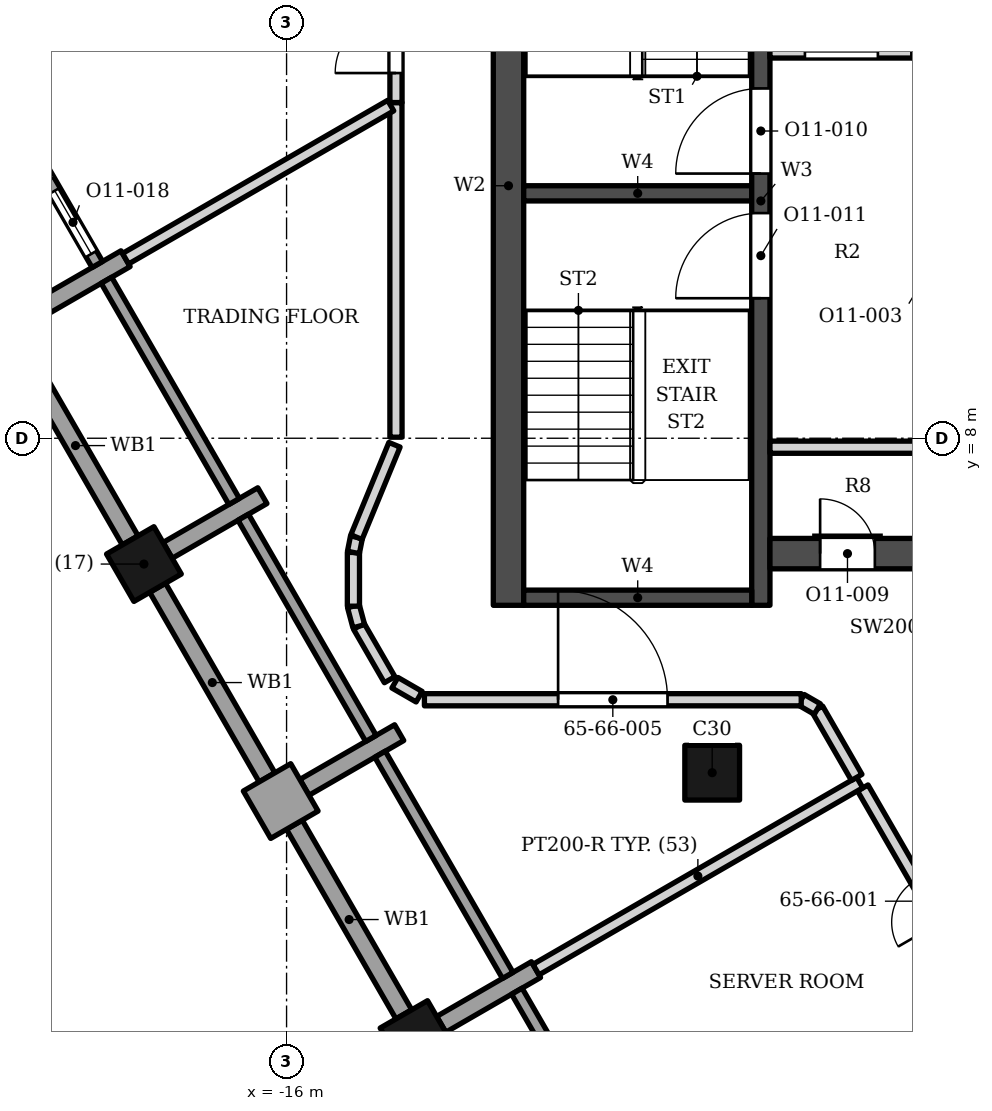
"""IFC4 building model, lengths in metres.
Left out: names, types, materials, properties, quantities, classifications, styles, units other than length and angle.
Written with IfcOpenShell. Run it as: python <this file> out.ifc"""

import sys

from ifc_helpers import new_model, si_unit, direction, frame, frame_2d, origin, origin_2d, place, context, subcontext, project, spatial, rectangle, extrude, element, fill, save


model = new_model("IFC4")
c1 = context("Model", 3, precision=1e-05, world=origin(), true_north=direction((0.0, 1.0)))
c2 = subcontext(c1, "Body", "Model", "MODEL_VIEW")
j1 = project(units=[si_unit("LENGTHUNIT", "METRE"), si_unit("PLANEANGLEUNIT", "RADIAN")], contexts=[c1])
p1 = place(None, origin())
s1 = spatial("IfcSite", under=j1, at=p1, CompositionType="ELEMENT")
p2 = place(p1, origin())
s2 = spatial("IfcBuilding", under=s1, at=p2, CompositionType="ELEMENT")
p3 = place(p2, frame((0.0, 0.0, 271.6)))
s3 = spatial("IfcBuildingStorey", under=s2, at=p3, CompositionType="ELEMENT", Elevation=271.6)
p4 = place(p3, frame((-12.35, 5.253, 0.0), z_axis=(0.0, 0.0, 1.0), x_axis=(0.0, 1.0, 0.0)))
e1 = element("IfcWall", 1, at=p4, inside=s3, PredefinedType="SHEAR", context=c2, shape_type="SweptSolid", body=[
    extrude(rectangle(XDim=13.8, YDim=0.5, at=frame_2d((6.9, 0.0))), origin(), (0.0, 0.0, 1.0), 3.9),
])
p5 = place(p3, frame((-8.2, 5.253, 0.0), z_axis=(0.0, 0.0, 1.0), x_axis=(0.0, 1.0, 0.0)))
e2 = element("IfcWall", 2, at=p5, inside=s3, PredefinedType="SHEAR", context=c2, shape_type="SweptSolid", body=[
    extrude(rectangle(XDim=13.3, YDim=0.3, at=frame_2d((6.65, 0.0))), origin(), (0.0, 0.0, 1.0), 3.9),
])
p6 = place(p5, frame((7.1, 0.0, 0.0)))
e3 = element("IfcOpeningElement", 3, at=p6, cuts=e2, PredefinedType="OPENING", context=c2, shape_type="SweptSolid", body=[
    extrude(rectangle(XDim=1.4, YDim=2.1, at=frame_2d((0.7, 1.05))), frame((0.0, 0.16, 0.0), z_axis=(0.0, -1.0, 0.0), x_axis=(1.0, 0.0, 0.0)), (0.0, 0.0, 1.0), 0.32),
])
p7 = place(p5, frame((5.05, 0.0, 0.0)))
e4 = element("IfcOpeningElement", 4, at=p7, cuts=e2, PredefinedType="OPENING", context=c2, shape_type="SweptSolid", body=[
    extrude(rectangle(XDim=1.4, YDim=2.1, at=frame_2d((0.7, 1.05))), frame((0.0, 0.16, 0.0), z_axis=(0.0, -1.0, 0.0), x_axis=(1.0, 0.0, 0.0)), (0.0, 0.0, 1.0), 0.32),
])
for number, where, z_axis, x_axis in (
    (5, (-12.1, 12.028, 0.0), (0.0, 0.0, 1.0), (1.0, 0.0, 0.0)),
    (6, (-12.1, 5.378, 0.0), (0.0, 0.0, 1.0), (1.0, 0.0, 0.0)),
):
    element("IfcWall", number, at=place(p3, frame(where, z_axis=z_axis, x_axis=x_axis)), inside=s3, PredefinedType="SHEAR", context=c2, shape_type="SweptSolid", body=[
        extrude(rectangle(XDim=3.75, YDim=0.25, at=frame_2d((1.875, 0.0))), origin(), (0.0, 0.0, 1.0), 3.9),
    ])
p8 = place(p3, frame((-8.05, 6.103, 0.0), z_axis=(0.0, 0.0, 1.0), x_axis=(1.0, 0.0, 0.0)))
e7 = element("IfcWall", 7, at=p8, inside=s3, PredefinedType="SHEAR", context=c2, shape_type="SweptSolid", body=[
    extrude(rectangle(XDim=7.05, YDim=0.5, at=frame_2d((3.525, 0.0))), origin(), (0.0, 0.0, 1.0), 3.9),
])
p9 = place(p8, frame((0.825, 0.0, 0.0)))
e8 = element("IfcOpeningElement", 8, at=p9, cuts=e7, PredefinedType="OPENING", context=c2, shape_type="SweptSolid", body=[
    extrude(rectangle(XDim=0.9, YDim=2.1, at=frame_2d((0.45, 1.05))), frame((0.0, 0.26, 0.0), z_axis=(0.0, -1.0, 0.0), x_axis=(1.0, 0.0, 0.0)), (0.0, 0.0, 1.0), 0.52),
])
for number, where, z_axis, x_axis in (
    (9, (-9.0, 2.5, 0.0), (0.0, 0.0, 1.0), (1.0, 0.0, 0.0)),
    (10, (-18.346, 5.931, 0.0), (0.0, 0.0, 1.0), (0.5, -0.866, 0.0)),
    (11, (-13.846, -1.864, 0.0), (0.0, 0.0, 1.0), (0.5, -0.866, 0.0)),
):
    element("IfcColumn", number, at=place(p3, frame(where, z_axis=z_axis, x_axis=x_axis)), inside=s3, PredefinedType="COLUMN", context=c2, shape_type="SweptSolid", body=[
        extrude(rectangle(XDim=0.9, YDim=0.9, at=origin_2d()), origin(), (0.0, 0.0, 1.0), 3.9),
    ])
p10 = place(p3, frame((-20.207, 10.053, 0.0), z_axis=(0.0, 0.0, 1.0), x_axis=(0.865989075817, 0.500062916607, 0.0)))
e12 = element("IfcWall", 12, at=p10, inside=s3, PredefinedType="SOLIDWALL", context=c2, shape_type="SweptSolid", body=[
    extrude(rectangle(XDim=1.8, YDim=0.3, at=frame_2d((0.9, 0.0))), origin(), (0.0, 0.0, 1.0), 3.0),
])
p11 = place(p3, frame((-17.956, 6.156, 0.0), z_axis=(0.0, 0.0, 1.0), x_axis=(0.866072636901, 0.499918180918, 0.0)))
e13 = element("IfcWall", 13, at=p11, inside=s3, PredefinedType="SOLIDWALL", context=c2, shape_type="SweptSolid", body=[
    extrude(rectangle(XDim=1.8, YDim=0.3, at=frame_2d((0.9, 0.0))), origin(), (0.0, 0.0, 1.0), 2.95),
])
p12 = place(p3, frame((-16.486, 1.809, 0.0), z_axis=(0.0, 0.0, 1.0), x_axis=(0.866013897511, 0.50001992892, 0.0)))
e14 = element("IfcWall", 14, at=p12, inside=s3, PredefinedType="SOLIDWALL", context=c2, shape_type="SweptSolid", body=[
    extrude(rectangle(XDim=0.9, YDim=0.9, at=frame_2d((0.45, 0.0))), origin(), (0.0, 0.0, 1.0), 3.0),
])
for number, where, z_axis, x_axis in (
    (15, (-15.707, 2.259, 0.0), (0.0, 0.0, 1.0), (0.866, 0.5, 0.0)),
    (16, (-13.457, -1.638, 0.0), (0.0, 0.0, 1.0), (0.866, 0.5, 0.0)),
):
    element("IfcWall", number, at=place(p3, frame(where, z_axis=z_axis, x_axis=x_axis)), inside=s3, PredefinedType="SOLIDWALL", context=c2, shape_type="SweptSolid", body=[
        extrude(rectangle(XDim=1.8, YDim=0.3, at=frame_2d((0.9, 0.0))), origin(), (0.0, 0.0, 1.0), 3.0),
    ])
p13 = place(p3, frame((-21.212, 14.495, 0.0), z_axis=(0.0, 0.0, 1.0), x_axis=(0.500002543286, -0.866023935413, 0.0)))
e17 = element("IfcWall", 17, at=p13, inside=s3, PredefinedType="ELEMENTEDWALL", context=c2, shape_type="SweptSolid", body=[
    extrude(rectangle(XDim=4.2, YDim=0.2, at=frame_2d((2.1, 0.0))), origin(), (0.0, 0.0, 1.0), 3.0),
])
p14 = place(p13, frame((0.2, 0.0, 0.45)))
e18 = element("IfcOpeningElement", 18, at=p14, cuts=e17, PredefinedType="OPENING", context=c2, shape_type="SweptSolid", body=[
    extrude(rectangle(XDim=2.4, YDim=2.25, at=frame_2d((1.2, 1.125))), frame((0.0, 0.11, 0.0), z_axis=(0.0, -1.0, 0.0), x_axis=(1.0, 0.0, 0.0)), (0.0, 0.0, 1.0), 0.22),
])
p15 = place(p13, frame((2.8, 0.0, 0.0)))
e19 = element("IfcOpeningElement", 19, at=p15, cuts=e17, PredefinedType="OPENING", context=c2, shape_type="SweptSolid", body=[
    extrude(rectangle(XDim=1.2, YDim=2.7, at=frame_2d((0.6, 1.35))), frame((0.0, 0.11, 0.0), z_axis=(0.0, -1.0, 0.0), x_axis=(1.0, 0.0, 0.0)), (0.0, 0.0, 1.0), 0.22),
])
p16 = place(p3, frame((-20.371, 9.438, 0.0), z_axis=(0.0, 0.0, 1.0), x_axis=(0.500012057535, -0.866018442252, 0.0)))
e20 = element("IfcWall", 20, at=p16, inside=s3, PredefinedType="SOLIDWALL", context=c2, shape_type="SweptSolid", body=[
    extrude(rectangle(XDim=3.6, YDim=0.3, at=frame_2d((1.8, 0.0))), origin(), (0.0, 0.0, 1.0), 3.0),
])
p17 = place(p3, frame((-18.962, 10.598, 0.0), z_axis=(0.0, 0.0, 1.0), x_axis=(0.500027713859, -0.866009402589, 0.0)))
e21 = element("IfcWall", 21, at=p17, inside=s3, PredefinedType="ELEMENTEDWALL", context=c2, shape_type="SweptSolid", body=[
    extrude(rectangle(XDim=4.2, YDim=0.2, at=frame_2d((2.1, 0.0))), origin(), (0.0, 0.0, 1.0), 3.0),
])
p18 = place(p3, frame((-18.121, 5.541, 0.0), z_axis=(0.0, 0.0, 1.0), x_axis=(0.500012057535, -0.866018442252, 0.0)))
e22 = element("IfcWall", 22, at=p18, inside=s3, PredefinedType="SOLIDWALL", context=c2, shape_type="SweptSolid", body=[
    extrude(rectangle(XDim=3.6, YDim=0.3, at=frame_2d((1.8, 0.0))), origin(), (0.0, 0.0, 1.0), 3.0),
])
p19 = place(p3, frame((-16.712, 6.701, 0.0), z_axis=(0.0, 0.0, 1.0), x_axis=(0.500027713859, -0.866009402589, 0.0)))
e23 = element("IfcWall", 23, at=p19, inside=s3, PredefinedType="ELEMENTEDWALL", context=c2, shape_type="SweptSolid", body=[
    extrude(rectangle(XDim=4.2, YDim=0.2, at=frame_2d((2.1, 0.0))), origin(), (0.0, 0.0, 1.0), 2.95),
])
p20 = place(p3, frame((-15.871, 1.644, 0.0), z_axis=(0.0, 0.0, 1.0), x_axis=(0.500012057535, -0.866018442252, 0.0)))
e24 = element("IfcWall", 24, at=p20, inside=s3, PredefinedType="SOLIDWALL", context=c2, shape_type="SweptSolid", body=[
    extrude(rectangle(XDim=3.6, YDim=0.3, at=frame_2d((1.8, 0.0))), origin(), (0.0, 0.0, 1.0), 3.0),
])
for number, where, z_axis, x_axis in (
    (25, (-14.462, 2.804, 0.0), (0.0, 0.0, 1.0), (0.5, -0.866, 0.0)),
    (26, (-12.212, -1.094, 0.0), (0.0, 0.0, 1.0), (0.5, -0.866, 0.0)),
):
    element("IfcWall", number, at=place(p3, frame(where, z_axis=z_axis, x_axis=x_axis)), inside=s3, PredefinedType="ELEMENTEDWALL", context=c2, shape_type="SweptSolid", body=[
        extrude(rectangle(XDim=4.2, YDim=0.2, at=frame_2d((2.1, 0.0))), origin(), (0.0, 0.0, 1.0), 3.0),
    ])
p21 = place(p3, frame((-8.05, 7.853, 0.0), z_axis=(0.0, 0.0, 1.0), x_axis=(1.0, 0.0, 0.0)))
e27 = element("IfcWall", 27, at=p21, inside=s3, PredefinedType="SOLIDWALL", context=c2, shape_type="SweptSolid", body=[
    extrude(rectangle(XDim=2.5, YDim=0.2, at=frame_2d((1.25, 0.0))), origin(), (0.0, 0.0, 1.0), 3.73),
])
p22 = place(p3, frame((-8.05, 14.353, 0.0), z_axis=(0.0, 0.0, 1.0), x_axis=(1.0, 0.0, 0.0)))
e28 = element("IfcWall", 28, at=p22, inside=s3, PredefinedType="SOLIDWALL", context=c2, shape_type="SweptSolid", body=[
    extrude(rectangle(XDim=2.35, YDim=0.2, at=frame_2d((1.175, 0.0))), origin(), (0.0, 0.0, 1.0), 3.73),
])
p23 = place(p22, frame((0.575, 0.0, 0.0)))
e29 = element("IfcOpeningElement", 29, at=p23, cuts=e28, PredefinedType="OPENING", context=c2, shape_type="SweptSolid", body=[
    extrude(rectangle(XDim=1.2, YDim=2.1, at=frame_2d((0.6, 1.05))), frame((0.0, 0.11, 0.0), z_axis=(0.0, -1.0, 0.0), x_axis=(1.0, 0.0, 0.0)), (0.0, 0.0, 1.0), 0.22),
])
p24 = place(p3, frame((-9.648, -4.636, 0.0), z_axis=(0.0, 0.0, 1.0), x_axis=(0.866169461704, 0.499750401311, 0.0)))
e30 = element("IfcWall", 30, at=p24, inside=s3, PredefinedType="PARTITIONING", context=c2, shape_type="SweptSolid", body=[
    extrude(rectangle(XDim=6.05, YDim=0.2, at=frame_2d((3.025, 0.0))), origin(), (0.0, 0.0, 1.0), 2.884),
])
p25 = place(p3, frame((-6.523, 2.249, 0.0), z_axis=(0.0, 0.0, 1.0), x_axis=(0.50001224981, -0.866018331238, 0.0)))
e31 = element("IfcWall", 31, at=p25, inside=s3, PredefinedType="PARTITIONING", context=c2, shape_type="SweptSolid", body=[
    extrude(rectangle(XDim=4.4, YDim=0.2, at=frame_2d((2.2, 0.0))), origin(), (0.0, 0.0, 1.0), 2.884),
])
p26 = place(p25, frame((1.75, 0.0, 0.0)))
e32 = element("IfcOpeningElement", 32, at=p26, cuts=e31, PredefinedType="OPENING", context=c2, shape_type="SweptSolid", body=[
    extrude(rectangle(XDim=0.8, YDim=2.1, at=frame_2d((0.4, 1.05))), frame((0.0, 0.11, 0.0), z_axis=(0.0, -1.0, 0.0), x_axis=(1.0, 0.0, 0.0)), (0.0, 0.0, 1.0), 0.22),
])
p27 = place(p3, frame((-11.898, -0.738, 0.0), z_axis=(0.0, 0.0, 1.0), x_axis=(0.865915132248, 0.500190947283, 0.0)))
e33 = element("IfcWall", 33, at=p27, inside=s3, PredefinedType="PARTITIONING", context=c2, shape_type="SweptSolid", body=[
    extrude(rectangle(XDim=6.149, YDim=0.2, at=frame_2d((3.075, 0.0))), origin(), (0.0, 0.0, 1.0), 3.128),
])
p28 = place(p3, frame((-7.271, 3.546, 0.0), z_axis=(0.0, 0.0, 1.0), x_axis=(0.499075838414, -0.866558311663, 0.0)))
e34 = element("IfcWall", 34, at=p28, inside=s3, PredefinedType="PARTITIONING", context=c2, shape_type="SweptSolid", body=[
    extrude(rectangle(XDim=1.297, YDim=0.2, at=frame_2d((0.648, 0.0))), origin(), (0.0, 0.0, 1.0), 3.73),
])
p29 = place(p3, frame((-7.536, 3.699, 0.0), z_axis=(0.0, 0.0, 1.0), x_axis=(0.866026229868, -0.499998569178, 0.0)))
e35 = element("IfcWall", 35, at=p29, inside=s3, PredefinedType="PARTITIONING", context=c2, shape_type="SweptSolid", body=[
    extrude(rectangle(XDim=0.306, YDim=0.2, at=frame_2d((0.153, 0.0))), origin(), (0.0, 0.0, 1.0), 3.73),
])
p30 = place(p3, frame((-13.733, 3.699, 0.0), z_axis=(0.0, 0.0, 1.0), x_axis=(1.0, 0.0, 0.0)))
e36 = element("IfcWall", 36, at=p30, inside=s3, PredefinedType="PARTITIONING", context=c2, shape_type="SweptSolid", body=[
    extrude(rectangle(XDim=6.197, YDim=0.2, at=frame_2d((3.099, 0.0))), origin(), (0.0, 0.0, 1.0), 3.332),
])
p31 = place(p30, frame((2.198, 0.0, 0.0)))
e37 = element("IfcOpeningElement", 37, at=p31, cuts=e36, PredefinedType="OPENING", context=c2, shape_type="SweptSolid", body=[
    extrude(rectangle(XDim=1.8, YDim=2.4, at=frame_2d((0.9, 1.2))), frame((0.0, 0.11, 0.0), z_axis=(0.0, -1.0, 0.0), x_axis=(1.0, 0.0, 0.0)), (0.0, 0.0, 1.0), 0.22),
])
p32 = place(p3, frame((-14.218, 3.979, 0.0), z_axis=(0.0, 0.0, 1.0), x_axis=(0.866212077504, -0.499676532155, 0.0)))
e38 = element("IfcWall", 38, at=p32, inside=s3, PredefinedType="PARTITIONING", context=c2, shape_type="SweptSolid", body=[
    extrude(rectangle(XDim=0.46, YDim=0.2, at=frame_2d((0.23, 0.0))), origin(), (0.0, 0.0, 1.0), 3.73),
])
p33 = place(p3, frame((-14.812, 4.908, 0.0), z_axis=(0.0, 0.0, 1.0), x_axis=(0.500021003115, -0.866013277291, 0.0)))
e39 = element("IfcWall", 39, at=p33, inside=s3, PredefinedType="PARTITIONING", context=c2, shape_type="SweptSolid", body=[
    extrude(rectangle(XDim=1.015, YDim=0.2, at=frame_2d((0.507, 0.0))), origin(), (0.0, 0.0, 1.0), 3.73),
])
p34 = place(p3, frame((-14.9, 5.238, 0.0), z_axis=(0.0, 0.0, 1.0), x_axis=(0.258640848646, -0.965973556269, 0.0)))
e40 = element("IfcWall", 40, at=p34, inside=s3, PredefinedType="PARTITIONING", context=c2, shape_type="SweptSolid", body=[
    extrude(rectangle(XDim=0.342, YDim=0.2, at=frame_2d((0.171, 0.0))), origin(), (0.0, 0.0, 1.0), 3.73),
])
p35 = place(p3, frame((-14.9, 6.122, 0.0), z_axis=(0.0, 0.0, 1.0), x_axis=(0.0, -1.0, 0.0)))
e41 = element("IfcWall", 41, at=p35, inside=s3, PredefinedType="PARTITIONING", context=c2, shape_type="SweptSolid", body=[
    extrude(rectangle(XDim=0.884, YDim=0.2, at=frame_2d((0.442, 0.0))), origin(), (0.0, 0.0, 1.0), 2.95),
])
p36 = place(p3, frame((-14.9, 6.122, 0.0), z_axis=(0.0, 0.0, 1.0), x_axis=(0.194284304518, 0.980945263008, 0.0)))
e42 = element("IfcWall", 42, at=p36, inside=s3, PredefinedType="PARTITIONING", context=c2, shape_type="SweptSolid", body=[
    extrude(rectangle(XDim=0.256, YDim=0.2, at=frame_2d((0.128, 0.0))), origin(), (0.0, 0.0, 1.0), 2.95),
])
p37 = place(p3, frame((-14.851, 6.374, 0.0), z_axis=(0.0, 0.0, 1.0), x_axis=(0.380697489052, 0.924699638709, 0.0)))
e43 = element("IfcWall", 43, at=p37, inside=s3, PredefinedType="PARTITIONING", context=c2, shape_type="SweptSolid", body=[
    extrude(rectangle(XDim=1.643, YDim=0.2, at=frame_2d((0.822, 0.0))), origin(), (0.0, 0.0, 1.0), 3.73),
])
p38 = place(p3, frame((-14.202, 13.52, 0.0), z_axis=(0.0, 0.0, 1.0), x_axis=(0.000266228859, -0.999999964561, 0.0)))
e44 = element("IfcWall", 44, at=p38, inside=s3, PredefinedType="PARTITIONING", context=c2, shape_type="SweptSolid", body=[
    extrude(rectangle(XDim=5.502, YDim=0.2, at=frame_2d((2.751, 0.0))), origin(), (0.0, 0.0, 1.0), 3.73),
])
p39 = place(p3, frame((-18.648, 10.953, 0.0), z_axis=(0.0, 0.0, 1.0), x_axis=(0.866005524168, 0.500034430925, 0.0)))
e45 = element("IfcWall", 45, at=p39, inside=s3, PredefinedType="PARTITIONING", context=c2, shape_type="SweptSolid", body=[
    extrude(rectangle(XDim=5.035, YDim=0.2, at=frame_2d((2.518, 0.0))), origin(), (0.0, 0.0, 1.0), 3.128),
])
p40 = place(p3, frame((-14.2, 13.521, 0.0), z_axis=(0.0, 0.0, 1.0), x_axis=(0.0, 1.0, 0.0)))
e46 = element("IfcWall", 46, at=p40, inside=s3, PredefinedType="PARTITIONING", context=c2, shape_type="SweptSolid", body=[
    extrude(rectangle(XDim=1.772, YDim=0.2, at=frame_2d((0.886, 0.0))), origin(), (0.0, 0.0, 1.0), 3.73),
])
p41 = place(p40, frame((0.485, 0.0, 0.0)))
e47 = element("IfcOpeningElement", 47, at=p41, cuts=e46, PredefinedType="OPENING", context=c2, shape_type="SweptSolid", body=[
    extrude(rectangle(XDim=1.0, YDim=2.1, at=frame_2d((0.5, 1.05))), frame((0.0, 0.11, 0.0), z_axis=(0.0, -1.0, 0.0), x_axis=(1.0, 0.0, 0.0)), (0.0, 0.0, 1.0), 0.22),
])
p42 = place(p15, origin())
e48 = element("IfcDoor", 48, at=p42, inside=s3, OperationType="SINGLE_SWING_LEFT", PredefinedType="DOOR", context=c2, shape_type="SweptSolid", body=[
    extrude(rectangle(XDim=1.2, YDim=2.7, at=frame_2d((0.6, 1.35))), frame((0.0, 0.025, 0.0), z_axis=(0.0, -1.0, 0.0), x_axis=(1.0, 0.0, 0.0)), (0.0, 0.0, 1.0), 0.05),
])
fill(e19, e48)
p43 = place(p23, origin())
e49 = element("IfcDoor", 49, at=p43, inside=s3, OperationType="DOUBLE_DOOR_SLIDING", PredefinedType="DOOR", context=c2, shape_type="SweptSolid", body=[
    extrude(rectangle(XDim=1.2, YDim=2.1, at=frame_2d((0.6, 1.05))), frame((0.0, 0.025, 0.0), z_axis=(0.0, -1.0, 0.0), x_axis=(1.0, 0.0, 0.0)), (0.0, 0.0, 1.0), 0.05),
])
fill(e29, e49)
p44 = place(p6, origin())
e50 = element("IfcDoor", 50, at=p44, inside=s3, OperationType="SINGLE_SWING_LEFT", PredefinedType="DOOR", context=c2, shape_type="SweptSolid", body=[
    extrude(rectangle(XDim=1.4, YDim=2.1, at=frame_2d((0.7, 1.05))), frame((0.0, 0.025, 0.0), z_axis=(0.0, -1.0, 0.0), x_axis=(1.0, 0.0, 0.0)), (0.0, 0.0, 1.0), 0.05),
])
fill(e3, e50)
p45 = place(p7, origin())
e51 = element("IfcDoor", 51, at=p45, inside=s3, OperationType="SINGLE_SWING_LEFT", PredefinedType="DOOR", context=c2, shape_type="SweptSolid", body=[
    extrude(rectangle(XDim=1.4, YDim=2.1, at=frame_2d((0.7, 1.05))), frame((0.0, 0.025, 0.0), z_axis=(0.0, -1.0, 0.0), x_axis=(1.0, 0.0, 0.0)), (0.0, 0.0, 1.0), 0.05),
])
fill(e4, e51)
p46 = place(p9, origin())
e52 = element("IfcDoor", 52, at=p46, inside=s3, OperationType="SINGLE_SWING_LEFT", PredefinedType="DOOR", context=c2, shape_type="SweptSolid", body=[
    extrude(rectangle(XDim=0.9, YDim=2.1, at=frame_2d((0.45, 1.05))), frame((0.0, 0.025, 0.0), z_axis=(0.0, -1.0, 0.0), x_axis=(1.0, 0.0, 0.0)), (0.0, 0.0, 1.0), 0.05),
])
fill(e8, e52)
p47 = place(p31, origin())
e53 = element("IfcDoor", 53, at=p47, inside=s3, OperationType="DOUBLE_DOOR_SINGLE_SWING", PredefinedType="DOOR", context=c2, shape_type="SweptSolid", body=[
    extrude(rectangle(XDim=1.8, YDim=2.4, at=frame_2d((0.9, 1.2))), frame((0.0, 0.025, 0.0), z_axis=(0.0, -1.0, 0.0), x_axis=(1.0, 0.0, 0.0)), (0.0, 0.0, 1.0), 0.05),
])
fill(e37, e53)
p48 = place(p41, origin())
e54 = element("IfcDoor", 54, at=p48, inside=s3, OperationType="SINGLE_SWING_LEFT", PredefinedType="DOOR", context=c2, shape_type="SweptSolid", body=[
    extrude(rectangle(XDim=1.0, YDim=2.1, at=frame_2d((0.5, 1.05))), frame((0.0, 0.025, 0.0), z_axis=(0.0, -1.0, 0.0), x_axis=(1.0, 0.0, 0.0)), (0.0, 0.0, 1.0), 0.05),
])
fill(e47, e54)
save(model, sys.argv[1])
